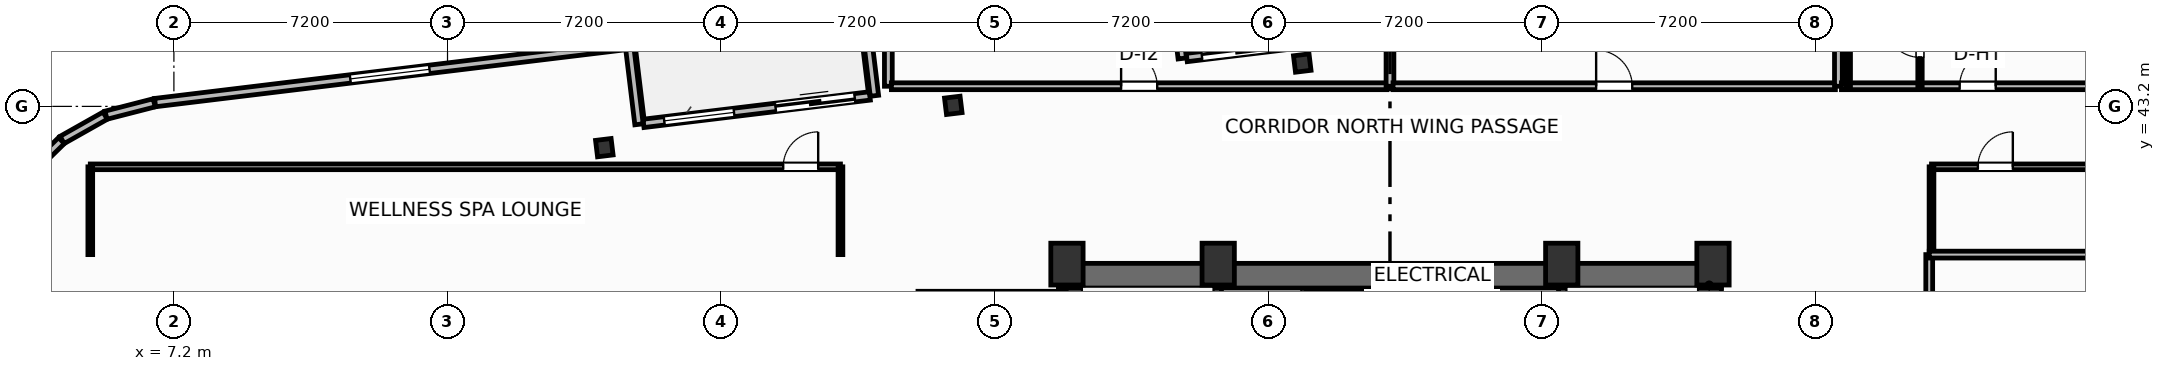
"""IFC4 building model, lengths in metres.
Left out: names, types, materials, properties, quantities, classifications, styles, units other than length and angle.
Written with IfcOpenShell. Run it as: python <this file> out.ifc"""

import sys

from ifc_helpers import new_model, si_unit, direction, frame, frame_2d, origin, origin_2d, place, context, subcontext, project, spatial, rectangle, i_section, extrude, element, fill, save


model = new_model("IFC4")
c1 = context("Model", 3, precision=1e-05, world=origin(), true_north=direction((0.0, 1.0)))
c2 = subcontext(c1, "Body", "Model", "MODEL_VIEW")
j1 = project(units=[si_unit("LENGTHUNIT", "METRE"), si_unit("PLANEANGLEUNIT", "RADIAN")], contexts=[c1])
p1 = place(None, origin())
s1 = spatial("IfcSite", under=j1, at=p1, CompositionType="ELEMENT")
p2 = place(p1, origin())
s2 = spatial("IfcBuilding", under=s1, at=p2, CompositionType="ELEMENT")
p3 = place(p2, frame((0.0, 0.0, 200.5)))
s3 = spatial("IfcBuildingStorey", under=s2, at=p3, CompositionType="ELEMENT", Elevation=200.5)
for number, where, z_axis, x_axis in (
    (1, (30.7, 39.05, 0.0), (0.0, 0.0, 1.0), (1.0, 0.0, 0.0)),
    (2, (34.68, 39.05, 0.0), (0.0, 0.0, 1.0), (1.0, 0.0, 0.0)),
    (3, (43.72, 39.05, 0.0), (0.0, 0.0, 1.0), (1.0, 0.0, 0.0)),
    (4, (47.7, 39.05, 0.0), (0.0, 0.0, 1.0), (1.0, 0.0, 0.0)),
):
    element("IfcColumn", number, at=place(p3, frame(where, z_axis=z_axis, x_axis=x_axis)), inside=s3, PredefinedType="COLUMN", context=c2, shape_type="SweptSolid", body=[
        extrude(rectangle(XDim=0.85, YDim=1.1, at=origin_2d()), origin(), (0.0, 0.0, 1.0), 3.7),
    ])
p4 = place(p3, frame((30.48, 38.745, 0.0), z_axis=(0.0, 0.0, 1.0), x_axis=(1.0, 0.0, 0.0)))
e5 = element("IfcWall", 5, at=p4, inside=s3, PredefinedType="SHEAR", context=c2, shape_type="SweptSolid", body=[
    extrude(rectangle(XDim=17.44, YDim=0.65, at=frame_2d((8.72, 0.0))), origin(), (0.0, 0.0, 1.0), 3.45),
])
for number, where, z_axis, x_axis in (
    (6, (30.805, 29.2, 0.0), (0.0, 0.0, 1.0), (0.0, 1.0, 0.0)),
    (7, (47.595, 29.2, 0.0), (0.0, 0.0, 1.0), (0.0, 1.0, 0.0)),
):
    element("IfcWall", number, at=place(p3, frame(where, z_axis=z_axis, x_axis=x_axis)), inside=s3, PredefinedType="SHEAR", context=c2, shape_type="SweptSolid", body=[
        extrude(rectangle(XDim=9.22, YDim=0.65, at=frame_2d((4.61, 0.0))), origin(), (0.0, 0.0, 1.0), 3.45),
    ])
p5 = place(p3, frame((34.64, 29.2, 0.0), z_axis=(0.0, 0.0, 1.0), x_axis=(0.0, 1.0, 0.0)))
e8 = element("IfcWall", 8, at=p5, inside=s3, PredefinedType="SHEAR", context=c2, shape_type="SweptSolid", body=[
    extrude(rectangle(XDim=9.22, YDim=0.25, at=frame_2d((4.61, 0.0))), origin(), (0.0, 0.0, 1.0), 3.45),
])
p6 = place(p5, frame((0.65, 0.0, 0.0)))
e9 = element("IfcOpeningElement", 9, at=p6, cuts=e8, PredefinedType="OPENING", context=c2, shape_type="SweptSolid", body=[
    extrude(rectangle(XDim=1.05, YDim=2.15, at=frame_2d((0.525, 1.075))), frame((0.0, 0.135, 0.0), z_axis=(0.0, -1.0, 0.0), x_axis=(1.0, 0.0, 0.0)), (0.0, 0.0, 1.0), 0.27),
])
p7 = place(p3, frame((43.76, 29.2, 0.0), z_axis=(0.0, 0.0, 1.0), x_axis=(0.0, 1.0, 0.0)))
e10 = element("IfcWall", 10, at=p7, inside=s3, PredefinedType="SHEAR", context=c2, shape_type="SweptSolid", body=[
    extrude(rectangle(XDim=9.22, YDim=0.25, at=frame_2d((4.61, 0.0))), origin(), (0.0, 0.0, 1.0), 3.45),
])
p8 = place(p7, frame((0.65, 0.0, 0.0)))
e11 = element("IfcOpeningElement", 11, at=p8, cuts=e10, PredefinedType="OPENING", context=c2, shape_type="SweptSolid", body=[
    extrude(rectangle(XDim=1.05, YDim=2.15, at=frame_2d((0.525, 1.075))), frame((0.0, 0.135, 0.0), z_axis=(0.0, -1.0, 0.0), x_axis=(1.0, 0.0, 0.0)), (0.0, 0.0, 1.0), 0.27),
])
for number, where, z_axis, x_axis in (
    (12, (36.892, 44.341, 0.0), (0.0, 0.0, 1.0), (0.993, 0.12, 0.0)),
    (13, (27.709, 43.227, 0.0), (0.0, 0.0, 1.0), (0.993, 0.12, 0.0)),
    (14, (18.526, 42.114, 0.0), (0.0, 0.0, 1.0), (0.993, 0.12, 0.0)),
):
    element("IfcColumn", number, at=place(p3, frame(where, z_axis=z_axis, x_axis=x_axis)), inside=s3, PredefinedType="COLUMN", context=c2, shape_type="SweptSolid", body=[
        extrude(i_section(OverallWidth=0.412, OverallDepth=0.435, WebThickness=0.036, FlangeThickness=0.057, FilletRadius=0.025, at=origin_2d()), origin(), (0.0, 0.0, 1.0), 3.7),
    ])
p9 = place(p3, frame((19.557, 42.753, 0.0), z_axis=(0.0, 0.0, 1.0), x_axis=(0.992729951822, 0.120362962556, 0.0)))
e15 = element("IfcWall", 15, at=p9, inside=s3, PredefinedType="SOLIDWALL", context=c2, shape_type="SweptSolid", body=[
    extrude(rectangle(XDim=6.0, YDim=0.22, at=frame_2d((3.0, 0.0))), origin(), (0.0, 0.0, 1.0), 2.73),
])
p10 = place(p9, frame((3.5, 0.0, 0.0)))
e16 = element("IfcOpeningElement", 16, at=p10, cuts=e15, PredefinedType="OPENING", context=c2, shape_type="SweptSolid", body=[
    extrude(rectangle(XDim=2.1, YDim=2.3, at=frame_2d((1.05, 1.15))), frame((0.0, 0.12, 0.0), z_axis=(0.0, -1.0, 0.0), x_axis=(1.0, 0.0, 0.0)), (0.0, 0.0, 1.0), 0.24),
])
p11 = place(p9, frame((0.55, 0.0, 0.75)))
e17 = element("IfcOpeningElement", 17, at=p11, cuts=e15, PredefinedType="OPENING", context=c2, shape_type="SweptSolid", body=[
    extrude(rectangle(XDim=1.85, YDim=1.75, at=frame_2d((0.925, 0.875))), frame((0.0, 0.12, 0.0), z_axis=(0.0, -1.0, 0.0), x_axis=(1.0, 0.0, 0.0)), (0.0, 0.0, 1.0), 0.24),
])
p12 = place(p3, frame((33.852, 44.486, 0.0), z_axis=(0.0, 0.0, 1.0), x_axis=(0.992729951822, 0.120362962556, 0.0)))
e18 = element("IfcWall", 18, at=p12, inside=s3, PredefinedType="SOLIDWALL", context=c2, shape_type="SweptSolid", body=[
    extrude(rectangle(XDim=6.0, YDim=0.22, at=frame_2d((3.0, 0.0))), origin(), (0.0, 0.0, 1.0), 2.73),
])
p13 = place(p12, frame((0.4, 0.0, 0.0)))
e19 = element("IfcOpeningElement", 19, at=p13, cuts=e18, PredefinedType="OPENING", context=c2, shape_type="SweptSolid", body=[
    extrude(rectangle(XDim=2.1, YDim=2.3, at=frame_2d((1.05, 1.15))), frame((0.0, 0.12, 0.0), z_axis=(0.0, -1.0, 0.0), x_axis=(1.0, 0.0, 0.0)), (0.0, 0.0, 1.0), 0.24),
])
p14 = place(p3, frame((33.734, 44.461, 0.0), z_axis=(0.0, 0.0, 1.0), x_axis=(-0.120327895535, 0.992734202874, 0.0)))
e20 = element("IfcWall", 20, at=p14, inside=s3, PredefinedType="SOLIDWALL", context=c2, shape_type="SweptSolid", body=[
    extrude(rectangle(XDim=2.1, YDim=0.22, at=frame_2d((1.05, 0.0))), origin(), (0.0, 0.0, 1.0), 2.73),
])
p15 = place(p3, frame((25.396, 45.44, 0.0), z_axis=(0.0, 0.0, 1.0), x_axis=(0.120275992932, -0.992740492538, 0.0)))
e21 = element("IfcWall", 21, at=p15, inside=s3, PredefinedType="SOLIDWALL", context=c2, shape_type="SweptSolid", body=[
    extrude(rectangle(XDim=1.975, YDim=0.22, at=frame_2d((0.988, 0.0))), origin(), (0.0, 0.0, 1.0), 2.73),
])
p16 = place(p3, frame((19.439, 42.729, 0.0), z_axis=(0.0, 0.0, 1.0), x_axis=(-0.120327895535, 0.992734202874, 0.0)))
e22 = element("IfcWall", 22, at=p16, inside=s3, PredefinedType="SOLIDWALL", context=c2, shape_type="SweptSolid", body=[
    extrude(rectangle(XDim=2.1, YDim=0.22, at=frame_2d((1.05, 0.0))), origin(), (0.0, 0.0, 1.0), 2.73),
])
p17 = place(p3, frame((19.062, 44.798, 0.0), z_axis=(0.0, 0.0, 1.0), x_axis=(-0.992733569027, -0.120333124809, 0.0)))
e23 = element("IfcWall", 23, at=p17, inside=s3, PredefinedType="SOLIDWALL", context=c2, shape_type="SweptSolid", body=[
    extrude(rectangle(XDim=12.447, YDim=0.22, at=frame_2d((6.224, 0.0))), origin(), (0.0, 0.0, 1.0), 2.73),
])
p18 = place(p17, frame((5.174, 0.0, 0.8)))
e24 = element("IfcOpeningElement", 24, at=p18, cuts=e23, PredefinedType="OPENING", context=c2, shape_type="SweptSolid", body=[
    extrude(rectangle(XDim=2.1, YDim=1.75, at=frame_2d((1.05, 0.875))), frame((0.0, 0.12, 0.0), z_axis=(0.0, -1.0, 0.0), x_axis=(1.0, 0.0, 0.0)), (0.0, 0.0, 1.0), 0.24),
])
p19 = place(p3, frame((6.681, 43.294, 0.0), z_axis=(0.0, 0.0, 1.0), x_axis=(-0.968496788899, -0.2490260426, 0.0)))
e25 = element("IfcWall", 25, at=p19, inside=s3, PredefinedType="SOLIDWALL", context=c2, shape_type="SweptSolid", body=[
    extrude(rectangle(XDim=1.309, YDim=0.22, at=frame_2d((0.654, 0.0))), origin(), (0.0, 0.0, 1.0), 2.73),
])
for number, where, z_axis, x_axis in (
    (26, (5.392, 42.956, 0.0), (0.0, 0.0, 1.0), (-0.871, -0.491, 0.0)),
    (27, (4.241, 42.3, 0.0), (0.0, 0.0, 1.0), (-0.714, -0.7, 0.0)),
):
    element("IfcWall", number, at=place(p3, frame(where, z_axis=z_axis, x_axis=x_axis)), inside=s3, PredefinedType="SOLIDWALL", context=c2, shape_type="SweptSolid", body=[
        extrude(rectangle(XDim=1.301, YDim=0.22, at=frame_2d((0.65, 0.0))), origin(), (0.0, 0.0, 1.0), 2.73),
    ])
p20 = place(p3, frame((5.0, 41.61, 0.0), z_axis=(0.0, 0.0, 1.0), x_axis=(1.0, 0.0, 0.0)))
e28 = element("IfcWall", 28, at=p20, inside=s3, PredefinedType="PARTITIONING", context=c2, shape_type="SweptSolid", body=[
    extrude(rectangle(XDim=19.74, YDim=0.15, at=frame_2d((9.87, 0.0))), origin(), (0.0, 0.0, 1.0), 2.662),
])
p21 = place(p20, frame((18.234, 0.0, 0.0)))
e29 = element("IfcOpeningElement", 29, at=p21, cuts=e28, PredefinedType="OPENING", context=c2, shape_type="SweptSolid", body=[
    extrude(rectangle(XDim=0.92, YDim=2.05, at=frame_2d((0.46, 1.025))), frame((0.0, 0.085, 0.0), z_axis=(0.0, -1.0, 0.0), x_axis=(1.0, 0.0, 0.0)), (0.0, 0.0, 1.0), 0.17),
])
for number, where, z_axis, x_axis in (
    (30, (5.0, 39.3, 0.0), (0.0, 0.0, 1.0), (0.0, 1.0, 0.0)),
    (31, (24.74, 39.3, 0.0), (0.0, 0.0, 1.0), (0.0, 1.0, 0.0)),
):
    element("IfcWall", number, at=place(p3, frame(where, z_axis=z_axis, x_axis=x_axis)), inside=s3, PredefinedType="PARTITIONING", context=c2, shape_type="SweptSolid", body=[
        extrude(rectangle(XDim=2.31, YDim=0.125, at=frame_2d((1.155, 0.0))), origin(), (0.0, 0.0, 1.0), 3.45),
    ])
p22 = place(p3, frame((53.45, 41.61, 0.0), z_axis=(0.0, 0.0, 1.0), x_axis=(1.0, 0.0, 0.0)))
e32 = element("IfcWall", 32, at=p22, inside=s3, PredefinedType="PARTITIONING", context=c2, shape_type="SweptSolid", body=[
    extrude(rectangle(XDim=16.55, YDim=0.15, at=frame_2d((8.275, 0.0))), origin(), (0.0, 0.0, 1.0), 3.45),
])
p23 = place(p22, frame((1.22, 0.0, 0.0)))
e33 = element("IfcOpeningElement", 33, at=p23, cuts=e32, PredefinedType="OPENING", context=c2, shape_type="SweptSolid", body=[
    extrude(rectangle(XDim=0.92, YDim=2.05, at=frame_2d((0.46, 1.025))), frame((0.0, 0.085, 0.0), z_axis=(0.0, -1.0, 0.0), x_axis=(1.0, 0.0, 0.0)), (0.0, 0.0, 1.0), 0.17),
])
p24 = place(p3, frame((53.45, 39.3, 0.0), z_axis=(0.0, 0.0, 1.0), x_axis=(0.0, 1.0, 0.0)))
e34 = element("IfcWall", 34, at=p24, inside=s3, PredefinedType="PARTITIONING", context=c2, shape_type="SweptSolid", body=[
    extrude(rectangle(XDim=2.31, YDim=0.125, at=frame_2d((1.155, 0.0))), origin(), (0.0, 0.0, 1.0), 3.45),
])
p25 = place(p3, frame((26.0, 43.73, 0.0), z_axis=(0.0, 0.0, 1.0), x_axis=(0.0, 1.0, 0.0)))
e35 = element("IfcWall", 35, at=p25, inside=s3, PredefinedType="PARTITIONING", context=c2, shape_type="SweptSolid", body=[
    extrude(rectangle(XDim=1.889, YDim=0.205, at=frame_2d((0.945, 0.0))), origin(), (0.0, 0.0, 1.0), 3.45),
])
p26 = place(p3, frame((26.08, 43.73, 0.0), z_axis=(0.0, 0.0, 1.0), x_axis=(1.0, 0.0, 0.0)))
e36 = element("IfcWall", 36, at=p26, inside=s3, PredefinedType="PARTITIONING", context=c2, shape_type="SweptSolid", body=[
    extrude(rectangle(XDim=13.04, YDim=0.18, at=frame_2d((6.52, 0.0))), origin(), (0.0, 0.0, 1.0), 2.824),
])
p27 = place(p26, frame((6.045, 0.0, 0.0)))
e37 = element("IfcOpeningElement", 37, at=p27, cuts=e36, PredefinedType="OPENING", context=c2, shape_type="SweptSolid", body=[
    extrude(rectangle(XDim=0.95, YDim=2.05, at=frame_2d((0.475, 1.025))), frame((0.0, 0.1, 0.0), z_axis=(0.0, -1.0, 0.0), x_axis=(1.0, 0.0, 0.0)), (0.0, 0.0, 1.0), 0.2),
])
p28 = place(p3, frame((39.2, 43.73, 0.0), z_axis=(0.0, 0.0, 1.0), x_axis=(0.0, 1.0, 0.0)))
e38 = element("IfcWall", 38, at=p28, inside=s3, PredefinedType="PARTITIONING", context=c2, shape_type="SweptSolid", body=[
    extrude(rectangle(XDim=1.374, YDim=0.205, at=frame_2d((0.687, 0.0))), origin(), (0.0, 0.0, 1.0), 3.45),
])
p29 = place(p3, frame((39.28, 43.73, 0.0), z_axis=(0.0, 0.0, 1.0), x_axis=(1.0, 0.0, 0.0)))
e39 = element("IfcWall", 39, at=p29, inside=s3, PredefinedType="PARTITIONING", context=c2, shape_type="SweptSolid", body=[
    extrude(rectangle(XDim=11.64, YDim=0.18, at=frame_2d((5.82, 0.0))), origin(), (0.0, 0.0, 1.0), 3.018),
])
p30 = place(p29, frame((5.345, 0.0, 0.0)))
e40 = element("IfcOpeningElement", 40, at=p30, cuts=e39, PredefinedType="OPENING", context=c2, shape_type="SweptSolid", body=[
    extrude(rectangle(XDim=0.95, YDim=2.05, at=frame_2d((0.475, 1.025))), frame((0.0, 0.1, 0.0), z_axis=(0.0, -1.0, 0.0), x_axis=(1.0, 0.0, 0.0)), (0.0, 0.0, 1.0), 0.2),
])
p31 = place(p3, frame((51.0, 43.73, 0.0), z_axis=(0.0, 0.0, 1.0), x_axis=(0.0, 1.0, 0.0)))
e41 = element("IfcWall", 41, at=p31, inside=s3, PredefinedType="PARTITIONING", context=c2, shape_type="SweptSolid", body=[
    extrude(rectangle(XDim=2.804, YDim=0.205, at=frame_2d((1.402, 0.0))), origin(), (0.0, 0.0, 1.0), 3.45),
])
p32 = place(p3, frame((51.08, 43.73, 0.0), z_axis=(0.0, 0.0, 1.0), x_axis=(1.0, 0.0, 0.0)))
e42 = element("IfcWall", 42, at=p32, inside=s3, PredefinedType="PARTITIONING", context=c2, shape_type="SweptSolid", body=[
    extrude(rectangle(XDim=21.263, YDim=0.18, at=frame_2d((10.632, 0.0))), origin(), (0.0, 0.0, 1.0), 3.45),
])
p33 = place(p32, frame((3.11, 0.0, 0.0)))
e43 = element("IfcOpeningElement", 43, at=p33, cuts=e42, PredefinedType="OPENING", context=c2, shape_type="SweptSolid", body=[
    extrude(rectangle(XDim=0.95, YDim=2.15, at=frame_2d((0.475, 1.075))), frame((0.0, 0.1, 0.0), z_axis=(0.0, -1.0, 0.0), x_axis=(1.0, 0.0, 0.0)), (0.0, 0.0, 1.0), 0.2),
])
p34 = place(p3, frame((53.147, 43.73, 0.0), z_axis=(0.0, 0.0, 1.0), x_axis=(0.0, 1.0, 0.0)))
e44 = element("IfcWall", 44, at=p34, inside=s3, PredefinedType="PARTITIONING", context=c2, shape_type="SweptSolid", body=[
    extrude(rectangle(XDim=2.52, YDim=0.115, at=frame_2d((1.26, 0.0))), origin(), (0.0, 0.0, 1.0), 3.45),
])
p35 = place(p34, frame((0.76, 0.0, 0.0)))
e45 = element("IfcOpeningElement", 45, at=p35, cuts=e44, PredefinedType="OPENING", context=c2, shape_type="SweptSolid", body=[
    extrude(rectangle(XDim=0.9, YDim=2.05, at=frame_2d((0.45, 1.025))), frame((0.0, 0.067, 0.0), z_axis=(0.0, -1.0, 0.0), x_axis=(1.0, 0.0, 0.0)), (0.0, 0.0, 1.0), 0.135),
])
p36 = place(p3, frame((51.26, 43.73, 0.0), z_axis=(0.0, 0.0, 1.0), x_axis=(0.0, 1.0, 0.0)))
e46 = element("IfcWall", 46, at=p36, inside=s3, PredefinedType="PARTITIONING", context=c2, shape_type="SweptSolid", body=[
    extrude(rectangle(XDim=2.52, YDim=0.115, at=frame_2d((1.26, 0.0))), origin(), (0.0, 0.0, 1.0), 3.45),
])
p37 = place(p3, frame((53.39, 19.24, 0.0), z_axis=(0.0, 0.0, 1.0), x_axis=(0.0, 1.0, 0.0)))
e47 = element("IfcWall", 47, at=p37, inside=s3, PredefinedType="PARTITIONING", context=c2, shape_type="SweptSolid", body=[
    extrude(rectangle(XDim=20.06, YDim=0.18, at=frame_2d((10.03, 0.0))), origin(), (0.0, 0.0, 1.0), 3.45),
])
p38 = place(p37, frame((7.7, 0.0, 0.0)))
e48 = element("IfcOpeningElement", 48, at=p38, cuts=e47, PredefinedType="OPENING", context=c2, shape_type="SweptSolid", body=[
    extrude(rectangle(XDim=0.95, YDim=2.05, at=frame_2d((0.475, 1.025))), frame((0.0, 0.1, 0.0), z_axis=(0.0, -1.0, 0.0), x_axis=(1.0, 0.0, 0.0)), (0.0, 0.0, 1.0), 0.2),
])
p39 = place(p3, frame((53.39, 39.3, 0.0), z_axis=(0.0, 0.0, 1.0), x_axis=(1.0, 0.0, 0.0)))
e49 = element("IfcWall", 49, at=p39, inside=s3, PredefinedType="PARTITIONING", context=c2, shape_type="SweptSolid", body=[
    extrude(rectangle(XDim=19.49, YDim=0.18, at=frame_2d((9.745, 0.0))), origin(), (0.0, 0.0, 1.0), 3.45),
])
p40 = place(p10, origin())
e50 = element("IfcDoor", 50, at=p40, inside=s3, OperationType="SLIDING_TO_LEFT", PredefinedType="DOOR", context=c2, shape_type="SweptSolid", body=[
    extrude(rectangle(XDim=2.1, YDim=2.3, at=frame_2d((1.05, 1.15))), frame((0.0, 0.025, 0.0), z_axis=(0.0, -1.0, 0.0), x_axis=(1.0, 0.0, 0.0)), (0.0, 0.0, 1.0), 0.05),
])
fill(e16, e50)
p41 = place(p11, origin())
e51 = element("IfcWindow", 51, at=p41, inside=s3, PartitioningType="SINGLE_PANEL", PredefinedType="WINDOW", context=c2, shape_type="SweptSolid", body=[
    extrude(rectangle(XDim=1.85, YDim=1.75, at=frame_2d((0.925, 0.875))), frame((0.0, 0.03, 0.0), z_axis=(0.0, -1.0, 0.0), x_axis=(1.0, 0.0, 0.0)), (0.0, 0.0, 1.0), 0.06),
])
fill(e17, e51)
p42 = place(p13, origin())
e52 = element("IfcDoor", 52, at=p42, inside=s3, OperationType="SLIDING_TO_LEFT", PredefinedType="DOOR", context=c2, shape_type="SweptSolid", body=[
    extrude(rectangle(XDim=2.1, YDim=2.3, at=frame_2d((1.05, 1.15))), frame((0.0, 0.025, 0.0), z_axis=(0.0, -1.0, 0.0), x_axis=(1.0, 0.0, 0.0)), (0.0, 0.0, 1.0), 0.05),
])
fill(e19, e52)
p43 = place(p18, origin())
e53 = element("IfcWindow", 53, at=p43, inside=s3, PartitioningType="SINGLE_PANEL", PredefinedType="WINDOW", context=c2, shape_type="SweptSolid", body=[
    extrude(rectangle(XDim=2.1, YDim=1.75, at=frame_2d((1.05, 0.875))), frame((0.0, 0.03, 0.0), z_axis=(0.0, -1.0, 0.0), x_axis=(1.0, 0.0, 0.0)), (0.0, 0.0, 1.0), 0.06),
])
fill(e24, e53)
p44 = place(p21, origin())
e54 = element("IfcDoor", 54, at=p44, inside=s3, OperationType="SINGLE_SWING_RIGHT", PredefinedType="DOOR", context=c2, shape_type="SweptSolid", body=[
    extrude(rectangle(XDim=0.92, YDim=2.05, at=frame_2d((0.46, 1.025))), frame((0.0, 0.025, 0.0), z_axis=(0.0, -1.0, 0.0), x_axis=(1.0, 0.0, 0.0)), (0.0, 0.0, 1.0), 0.05),
])
fill(e29, e54)
p45 = place(p23, origin())
e55 = element("IfcDoor", 55, at=p45, inside=s3, OperationType="SINGLE_SWING_RIGHT", PredefinedType="DOOR", context=c2, shape_type="SweptSolid", body=[
    extrude(rectangle(XDim=0.92, YDim=2.05, at=frame_2d((0.46, 1.025))), frame((0.0, 0.025, 0.0), z_axis=(0.0, -1.0, 0.0), x_axis=(1.0, 0.0, 0.0)), (0.0, 0.0, 1.0), 0.05),
])
fill(e33, e55)
p46 = place(p27, origin())
e56 = element("IfcDoor", 56, at=p46, inside=s3, OperationType="SINGLE_SWING_LEFT", PredefinedType="DOOR", context=c2, shape_type="SweptSolid", body=[
    extrude(rectangle(XDim=0.95, YDim=2.05, at=frame_2d((0.475, 1.025))), frame((0.0, 0.025, 0.0), z_axis=(0.0, -1.0, 0.0), x_axis=(1.0, 0.0, 0.0)), (0.0, 0.0, 1.0), 0.05),
])
fill(e37, e56)
p47 = place(p30, origin())
e57 = element("IfcDoor", 57, at=p47, inside=s3, OperationType="SINGLE_SWING_LEFT", PredefinedType="DOOR", context=c2, shape_type="SweptSolid", body=[
    extrude(rectangle(XDim=0.95, YDim=2.05, at=frame_2d((0.475, 1.025))), frame((0.0, 0.025, 0.0), z_axis=(0.0, -1.0, 0.0), x_axis=(1.0, 0.0, 0.0)), (0.0, 0.0, 1.0), 0.05),
])
fill(e40, e57)
p48 = place(p33, origin())
e58 = element("IfcDoor", 58, at=p48, inside=s3, OperationType="SINGLE_SWING_RIGHT", PredefinedType="DOOR", context=c2, shape_type="SweptSolid", body=[
    extrude(rectangle(XDim=0.95, YDim=2.15, at=frame_2d((0.475, 1.075))), frame((0.0, 0.025, 0.0), z_axis=(0.0, -1.0, 0.0), x_axis=(1.0, 0.0, 0.0)), (0.0, 0.0, 1.0), 0.05),
])
fill(e43, e58)
p49 = place(p35, origin())
e59 = element("IfcDoor", 59, at=p49, inside=s3, OperationType="SINGLE_SWING_RIGHT", PredefinedType="DOOR", context=c2, shape_type="SweptSolid", body=[
    extrude(rectangle(XDim=0.9, YDim=2.05, at=frame_2d((0.45, 1.025))), frame((0.0, 0.025, 0.0), z_axis=(0.0, -1.0, 0.0), x_axis=(1.0, 0.0, 0.0)), (0.0, 0.0, 1.0), 0.05),
])
fill(e45, e59)
save(model, sys.argv[1])
